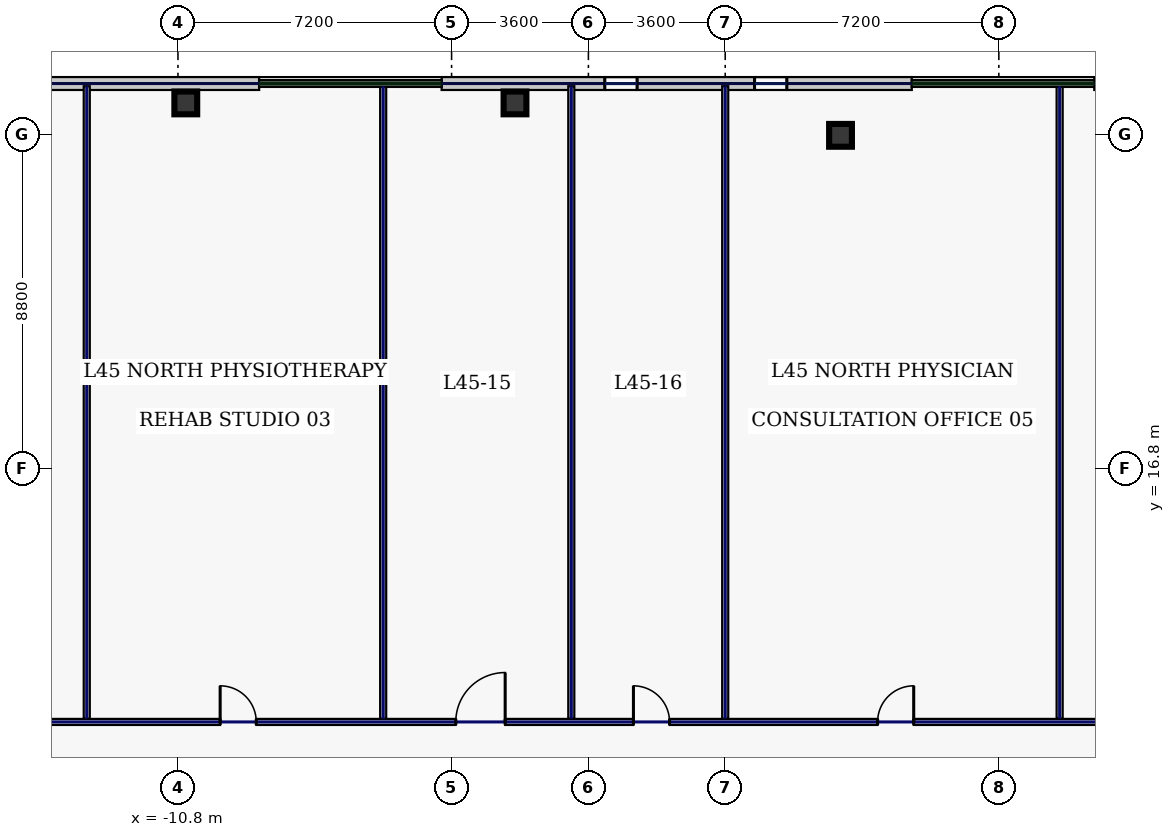
"""IFC4 building model, lengths in metres.
Left out: names, types, materials, properties, quantities, classifications, styles, units other than length and angle.
Written with IfcOpenShell. Run it as: python <this file> out.ifc"""

import sys

from ifc_helpers import new_model, si_unit, direction, frame, frame_2d, origin, origin_2d, place, context, subcontext, project, spatial, rectangle, hollow_rectangle, extrude, element, fill, save


model = new_model("IFC4")
c1 = context("Model", 3, precision=1e-05, world=origin(), true_north=direction((0.0, 1.0)))
c2 = subcontext(c1, "Body", "Model", "MODEL_VIEW")
j1 = project(units=[si_unit("LENGTHUNIT", "METRE"), si_unit("PLANEANGLEUNIT", "RADIAN")], contexts=[c1])
p1 = place(None, origin())
s1 = spatial("IfcSite", under=j1, at=p1, CompositionType="ELEMENT")
p2 = place(p1, origin())
s2 = spatial("IfcBuilding", under=s1, at=p2, CompositionType="ELEMENT")
p3 = place(p2, frame((0.0, 0.0, 196.2)))
s3 = spatial("IfcBuildingStorey", under=s2, at=p3, CompositionType="ELEMENT", Elevation=196.2)
for number, where, z_axis, x_axis in (
    (1, (6.634, 25.567, 0.0), (0.0, 0.0, 1.0), (1.0, 0.0, 0.0)),
    (2, (-1.931, 26.42, 0.0), (0.0, 0.0, 1.0), (1.0, 0.0, 0.0)),
    (3, (-10.594, 26.42, 0.0), (0.0, 0.0, 1.0), (1.0, 0.0, 0.0)),
):
    element("IfcColumn", number, at=place(p3, frame(where, z_axis=z_axis, x_axis=x_axis)), inside=s3, PredefinedType="COLUMN", context=c2, shape_type="SweptSolid", body=[
        extrude(hollow_rectangle(XDim=0.6, YDim=0.6, WallThickness=0.028, at=origin_2d()), origin(), (0.0, 0.0, 1.0), 3.74),
    ])
p4 = place(p3, frame((33.4, 26.93, 0.0), z_axis=(0.0, 0.0, 1.0), x_axis=(-1.0, 0.0, 0.0)))
e4 = element("IfcWall", 4, at=p4, inside=s3, PredefinedType="STANDARD", context=c2, shape_type="SweptSolid", body=[
    extrude(rectangle(XDim=20.09, YDim=0.34, at=frame_2d((10.045, 0.0))), origin(), (0.0, 0.0, 1.0), 3.74),
])
p5 = place(p4, frame((15.005, 0.0, 0.7)))
e5 = element("IfcOpeningElement", 5, at=p5, cuts=e4, PredefinedType="OPENING", context=c2, shape_type="SweptSolid", body=[
    extrude(rectangle(XDim=1.8, YDim=2.2, at=frame_2d((0.9, 1.1))), frame((0.0, 0.18, 0.0), z_axis=(0.0, -1.0, 0.0), x_axis=(1.0, 0.0, 0.0)), (0.0, 0.0, 1.0), 0.36),
])
p6 = place(p4, frame((11.071, 0.0, 0.7)))
e6 = element("IfcOpeningElement", 6, at=p6, cuts=e4, PredefinedType="OPENING", context=c2, shape_type="SweptSolid", body=[
    extrude(rectangle(XDim=1.8, YDim=2.2, at=frame_2d((0.9, 1.1))), frame((0.0, 0.18, 0.0), z_axis=(0.0, -1.0, 0.0), x_axis=(1.0, 0.0, 0.0)), (0.0, 0.0, 1.0), 0.36),
])
p7 = place(p4, frame((6.48, 0.0, 0.7)))
e7 = element("IfcOpeningElement", 7, at=p7, cuts=e4, PredefinedType="OPENING", context=c2, shape_type="SweptSolid", body=[
    extrude(rectangle(XDim=0.85, YDim=1.85, at=frame_2d((0.425, 0.925))), frame((0.0, 0.18, 0.0), z_axis=(0.0, -1.0, 0.0), x_axis=(1.0, 0.0, 0.0)), (0.0, 0.0, 1.0), 0.36),
])
p8 = place(p4, frame((2.591, 0.0, 0.7)))
e8 = element("IfcOpeningElement", 8, at=p8, cuts=e4, PredefinedType="OPENING", context=c2, shape_type="SweptSolid", body=[
    extrude(rectangle(XDim=1.8, YDim=2.2, at=frame_2d((0.9, 1.1))), frame((0.0, 0.18, 0.0), z_axis=(0.0, -1.0, 0.0), x_axis=(1.0, 0.0, 0.0)), (0.0, 0.0, 1.0), 0.36),
])
p9 = place(p3, frame((8.51, 26.93, 0.0), z_axis=(0.0, 0.0, 1.0), x_axis=(-1.0, 0.0, 0.0)))
e9 = element("IfcWall", 9, at=p9, inside=s3, PredefinedType="STANDARD", context=c2, shape_type="SweptSolid", body=[
    extrude(rectangle(XDim=12.373, YDim=0.34, at=frame_2d((6.187, 0.0))), origin(), (0.0, 0.0, 1.0), 3.74),
])
p10 = place(p9, frame((7.229, 0.0, 0.7)))
e10 = element("IfcOpeningElement", 10, at=p10, cuts=e9, PredefinedType="OPENING", context=c2, shape_type="SweptSolid", body=[
    extrude(rectangle(XDim=0.85, YDim=1.85, at=frame_2d((0.425, 0.925))), frame((0.0, 0.18, 0.0), z_axis=(0.0, -1.0, 0.0), x_axis=(1.0, 0.0, 0.0)), (0.0, 0.0, 1.0), 0.36),
])
p11 = place(p9, frame((3.289, 0.0, 0.7)))
e11 = element("IfcOpeningElement", 11, at=p11, cuts=e9, PredefinedType="OPENING", context=c2, shape_type="SweptSolid", body=[
    extrude(rectangle(XDim=0.85, YDim=1.85, at=frame_2d((0.425, 0.925))), frame((0.0, 0.18, 0.0), z_axis=(0.0, -1.0, 0.0), x_axis=(1.0, 0.0, 0.0)), (0.0, 0.0, 1.0), 0.36),
])
p12 = place(p3, frame((-8.663, 26.93, 0.0), z_axis=(0.0, 0.0, 1.0), x_axis=(-1.0, 0.0, 0.0)))
e12 = element("IfcWall", 12, at=p12, inside=s3, PredefinedType="STANDARD", context=c2, shape_type="SweptSolid", body=[
    extrude(rectangle(XDim=19.937, YDim=0.34, at=frame_2d((9.969, 0.0))), origin(), (0.0, 0.0, 1.0), 3.74),
])
p13 = place(p12, frame((16.968, 0.0, 0.7)))
e13 = element("IfcOpeningElement", 13, at=p13, cuts=e12, PredefinedType="OPENING", context=c2, shape_type="SweptSolid", body=[
    extrude(rectangle(XDim=0.85, YDim=1.85, at=frame_2d((0.425, 0.925))), frame((0.0, 0.18, 0.0), z_axis=(0.0, -1.0, 0.0), x_axis=(1.0, 0.0, 0.0)), (0.0, 0.0, 1.0), 0.36),
])
p14 = place(p12, frame((12.983, 0.0, 0.7)))
e14 = element("IfcOpeningElement", 14, at=p14, cuts=e12, PredefinedType="OPENING", context=c2, shape_type="SweptSolid", body=[
    extrude(rectangle(XDim=0.85, YDim=1.85, at=frame_2d((0.425, 0.925))), frame((0.0, 0.18, 0.0), z_axis=(0.0, -1.0, 0.0), x_axis=(1.0, 0.0, 0.0)), (0.0, 0.0, 1.0), 0.36),
])
p15 = place(p12, frame((7.355, 0.0, 0.7)))
e15 = element("IfcOpeningElement", 15, at=p15, cuts=e12, PredefinedType="OPENING", context=c2, shape_type="SweptSolid", body=[
    extrude(rectangle(XDim=1.8, YDim=2.2, at=frame_2d((0.9, 1.1))), frame((0.0, 0.18, 0.0), z_axis=(0.0, -1.0, 0.0), x_axis=(1.0, 0.0, 0.0)), (0.0, 0.0, 1.0), 0.36),
])
p16 = place(p3, frame((-24.965, 10.13, 0.0), z_axis=(0.0, 0.0, 1.0), x_axis=(1.0, 0.0, 0.0)))
e16 = element("IfcWall", 16, at=p16, inside=s3, PredefinedType="PARTITIONING", context=c2, shape_type="SweptSolid", body=[
    extrude(rectangle(XDim=49.93, YDim=0.16, at=frame_2d((24.965, 0.0))), origin(), (0.0, 0.0, 1.0), 3.74),
])
p17 = place(p16, frame((2.044, 0.0, 0.0)))
e17 = element("IfcOpeningElement", 17, at=p17, cuts=e16, PredefinedType="OPENING", context=c2, shape_type="SweptSolid", body=[
    extrude(rectangle(XDim=0.95, YDim=2.2, at=frame_2d((0.475, 1.1))), frame((0.0, 0.09, 0.0), z_axis=(0.0, -1.0, 0.0), x_axis=(1.0, 0.0, 0.0)), (0.0, 0.0, 1.0), 0.18),
])
p18 = place(p16, frame((7.775, 0.0, 0.0)))
e18 = element("IfcOpeningElement", 18, at=p18, cuts=e16, PredefinedType="OPENING", context=c2, shape_type="SweptSolid", body=[
    extrude(rectangle(XDim=0.95, YDim=2.2, at=frame_2d((0.475, 1.1))), frame((0.0, 0.09, 0.0), z_axis=(0.0, -1.0, 0.0), x_axis=(1.0, 0.0, 0.0)), (0.0, 0.0, 1.0), 0.18),
])
p19 = place(p16, frame((15.275, 0.0, 0.0)))
e19 = element("IfcOpeningElement", 19, at=p19, cuts=e16, PredefinedType="OPENING", context=c2, shape_type="SweptSolid", body=[
    extrude(rectangle(XDim=0.95, YDim=2.2, at=frame_2d((0.475, 1.1))), frame((0.0, 0.09, 0.0), z_axis=(0.0, -1.0, 0.0), x_axis=(1.0, 0.0, 0.0)), (0.0, 0.0, 1.0), 0.18),
])
p20 = place(p16, frame((21.475, 0.0, 0.0)))
e20 = element("IfcOpeningElement", 20, at=p20, cuts=e16, PredefinedType="OPENING", context=c2, shape_type="SweptSolid", body=[
    extrude(rectangle(XDim=1.3, YDim=2.2, at=frame_2d((0.65, 1.1))), frame((0.0, 0.09, 0.0), z_axis=(0.0, -1.0, 0.0), x_axis=(1.0, 0.0, 0.0)), (0.0, 0.0, 1.0), 0.18),
])
p21 = place(p16, frame((26.15, 0.0, 0.0)))
e21 = element("IfcOpeningElement", 21, at=p21, cuts=e16, PredefinedType="OPENING", context=c2, shape_type="SweptSolid", body=[
    extrude(rectangle(XDim=0.95, YDim=2.2, at=frame_2d((0.475, 1.1))), frame((0.0, 0.09, 0.0), z_axis=(0.0, -1.0, 0.0), x_axis=(1.0, 0.0, 0.0)), (0.0, 0.0, 1.0), 0.18),
])
p22 = place(p16, frame((32.575, 0.0, 0.0)))
e22 = element("IfcOpeningElement", 22, at=p22, cuts=e16, PredefinedType="OPENING", context=c2, shape_type="SweptSolid", body=[
    extrude(rectangle(XDim=0.95, YDim=2.2, at=frame_2d((0.475, 1.1))), frame((0.0, 0.09, 0.0), z_axis=(0.0, -1.0, 0.0), x_axis=(1.0, 0.0, 0.0)), (0.0, 0.0, 1.0), 0.18),
])
p23 = place(p16, frame((40.675, 0.0, 0.0)))
e23 = element("IfcOpeningElement", 23, at=p23, cuts=e16, PredefinedType="OPENING", context=c2, shape_type="SweptSolid", body=[
    extrude(rectangle(XDim=0.95, YDim=2.2, at=frame_2d((0.475, 1.1))), frame((0.0, 0.09, 0.0), z_axis=(0.0, -1.0, 0.0), x_axis=(1.0, 0.0, 0.0)), (0.0, 0.0, 1.0), 0.18),
])
p24 = place(p16, frame((46.631, 0.0, 0.0)))
e24 = element("IfcOpeningElement", 24, at=p24, cuts=e16, PredefinedType="OPENING", context=c2, shape_type="SweptSolid", body=[
    extrude(rectangle(XDim=1.3, YDim=2.2, at=frame_2d((0.65, 1.1))), frame((0.0, 0.09, 0.0), z_axis=(0.0, -1.0, 0.0), x_axis=(1.0, 0.0, 0.0)), (0.0, 0.0, 1.0), 0.18),
])
for number, where, z_axis, x_axis in (
    (25, (-13.2, 10.215, 0.0), (0.0, 0.0, 1.0), (0.0, 1.0, 0.0)),
    (26, (-5.4, 10.215, 0.0), (0.0, 0.0, 1.0), (0.0, 1.0, 0.0)),
    (27, (3.6, 10.215, 0.0), (0.0, 0.0, 1.0), (0.0, 1.0, 0.0)),
    (28, (12.4, 10.215, 0.0), (0.0, 0.0, 1.0), (0.0, 1.0, 0.0)),
    (29, (-0.45, 10.215, 0.0), (0.0, 0.0, 1.0), (0.0, 1.0, 0.0)),
):
    element("IfcWall", number, at=place(p3, frame(where, z_axis=z_axis, x_axis=x_axis)), inside=s3, PredefinedType="PARTITIONING", context=c2, shape_type="SweptSolid", body=[
        extrude(rectangle(XDim=16.645, YDim=0.16, at=frame_2d((8.323, 0.0))), origin(), (0.0, 0.0, 1.0), 3.74),
    ])
p25 = place(p10, origin())
e30 = element("IfcWindow", 30, at=p25, inside=s3, PartitioningType="SINGLE_PANEL", PredefinedType="WINDOW", context=c2, shape_type="SweptSolid", body=[
    extrude(rectangle(XDim=0.85, YDim=1.85, at=frame_2d((0.425, 0.925))), frame((0.0, 0.03, 0.0), z_axis=(0.0, -1.0, 0.0), x_axis=(1.0, 0.0, 0.0)), (0.0, 0.0, 1.0), 0.06),
])
fill(e10, e30)
p26 = place(p11, origin())
e31 = element("IfcWindow", 31, at=p26, inside=s3, PartitioningType="SINGLE_PANEL", PredefinedType="WINDOW", context=c2, shape_type="SweptSolid", body=[
    extrude(rectangle(XDim=0.85, YDim=1.85, at=frame_2d((0.425, 0.925))), frame((0.0, 0.03, 0.0), z_axis=(0.0, -1.0, 0.0), x_axis=(1.0, 0.0, 0.0)), (0.0, 0.0, 1.0), 0.06),
])
fill(e11, e31)
p27 = place(p19, origin())
e32 = element("IfcDoor", 32, at=p27, inside=s3, OperationType="SINGLE_SWING_LEFT", PredefinedType="DOOR", context=c2, shape_type="SweptSolid", body=[
    extrude(rectangle(XDim=0.95, YDim=2.2, at=frame_2d((0.475, 1.1))), frame((0.0, 0.025, 0.0), z_axis=(0.0, -1.0, 0.0), x_axis=(1.0, 0.0, 0.0)), (0.0, 0.0, 1.0), 0.05),
])
fill(e19, e32)
p28 = place(p20, origin())
e33 = element("IfcDoor", 33, at=p28, inside=s3, OperationType="SINGLE_SWING_RIGHT", PredefinedType="DOOR", context=c2, shape_type="SweptSolid", body=[
    extrude(rectangle(XDim=1.3, YDim=2.2, at=frame_2d((0.65, 1.1))), frame((0.0, 0.025, 0.0), z_axis=(0.0, -1.0, 0.0), x_axis=(1.0, 0.0, 0.0)), (0.0, 0.0, 1.0), 0.05),
])
fill(e20, e33)
p29 = place(p21, origin())
e34 = element("IfcDoor", 34, at=p29, inside=s3, OperationType="SINGLE_SWING_LEFT", PredefinedType="DOOR", context=c2, shape_type="SweptSolid", body=[
    extrude(rectangle(XDim=0.95, YDim=2.2, at=frame_2d((0.475, 1.1))), frame((0.0, 0.025, 0.0), z_axis=(0.0, -1.0, 0.0), x_axis=(1.0, 0.0, 0.0)), (0.0, 0.0, 1.0), 0.05),
])
fill(e21, e34)
p30 = place(p22, origin())
e35 = element("IfcDoor", 35, at=p30, inside=s3, OperationType="SINGLE_SWING_RIGHT", PredefinedType="DOOR", context=c2, shape_type="SweptSolid", body=[
    extrude(rectangle(XDim=0.95, YDim=2.2, at=frame_2d((0.475, 1.1))), frame((0.0, 0.025, 0.0), z_axis=(0.0, -1.0, 0.0), x_axis=(1.0, 0.0, 0.0)), (0.0, 0.0, 1.0), 0.05),
])
fill(e22, e35)
save(model, sys.argv[1])
